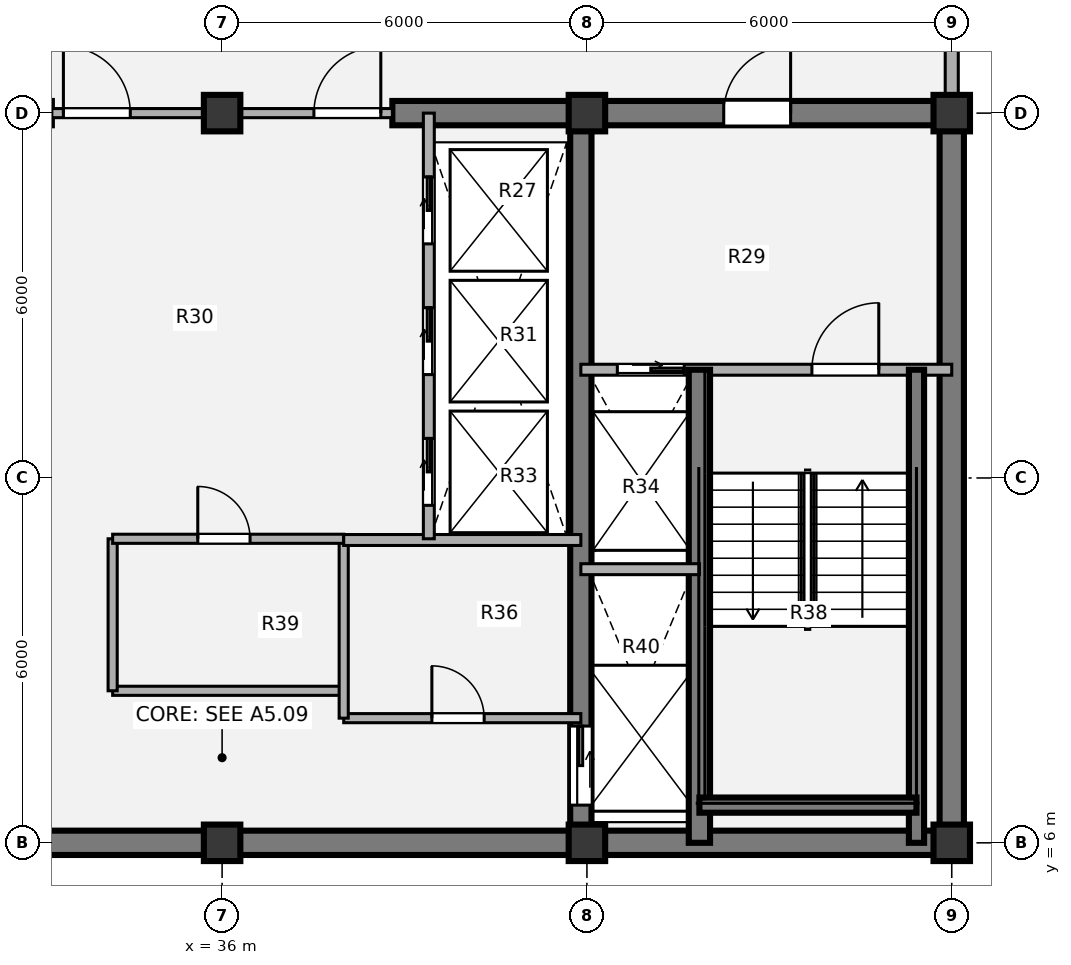
"""IFC4 building model, lengths in metres.
Left out: names, types, materials, properties, quantities, classifications, styles, units other than length and angle.
Written with IfcOpenShell. Run it as: python <this file> out.ifc"""

import sys

from ifc_helpers import new_model, si_unit, direction, frame, frame_2d, origin, origin_2d, place, context, subcontext, project, spatial, rectangle, extrude, source, transform, mapped, element, fill, save


model = new_model("IFC4")
c1 = context("Model", 3, precision=1e-05, world=origin(), true_north=direction((0.0, 1.0)))
c2 = subcontext(c1, "Body", "Model", "MODEL_VIEW")
j1 = project(units=[si_unit("LENGTHUNIT", "METRE"), si_unit("PLANEANGLEUNIT", "RADIAN")], contexts=[c1])
p1 = place(None, origin())
s1 = spatial("IfcSite", under=j1, at=p1, CompositionType="ELEMENT")
p2 = place(p1, origin())
s2 = spatial("IfcBuilding", under=s1, at=p2, CompositionType="ELEMENT")
p3 = place(p2, frame((0.0, 0.0, 234.36)))
s3 = spatial("IfcBuildingStorey", under=s2, at=p3, CompositionType="ELEMENT", Elevation=234.36)
m1 = source(origin(), c2, "Body", "SweptSolid", [
    extrude(rectangle(XDim=0.6, YDim=0.6, at=origin_2d()), origin(), (0.0, 0.0, 1.0), 3.78),
])
for number, where, z_axis, x_axis in (
    (1, (36.0, 6.0, 0.0), (0.0, 0.0, 1.0), (1.0, 0.0, 0.0)),
    (2, (42.0, 6.0, 0.0), (0.0, 0.0, 1.0), (1.0, 0.0, 0.0)),
    (3, (48.0, 6.0, 0.0), (0.0, 0.0, 1.0), (1.0, 0.0, 0.0)),
    (4, (36.0, 18.0, 0.0), (0.0, 0.0, 1.0), (1.0, 0.0, 0.0)),
    (5, (42.0, 18.0, 0.0), (0.0, 0.0, 1.0), (1.0, 0.0, 0.0)),
    (6, (48.0, 18.0, 0.0), (0.0, 0.0, 1.0), (1.0, 0.0, 0.0)),
):
    element("IfcColumn", number, at=place(p3, frame(where, z_axis=z_axis, x_axis=x_axis)), inside=s3, PredefinedType="COLUMN", context=c2, shape_type="MappedRepresentation", body=[
        mapped(m1, transform((0.0, 0.0, 0.0), x_axis=(1.0, 0.0, 0.0), y_axis=(0.0, 1.0, 0.0), z_axis=(0.0, 0.0, 1.0), scale=1.0)),
    ])
p4 = place(p3, frame((48.2, 6.0, 0.0), z_axis=(0.0, 0.0, 1.0), x_axis=(-1.0, 0.0, 0.0)))
e7 = element("IfcWall", 7, at=p4, inside=s3, PredefinedType="SHEAR", context=c2, shape_type="SweptSolid", body=[
    extrude(rectangle(XDim=24.4, YDim=0.4, at=frame_2d((12.2, 0.0))), origin(), (0.0, 0.0, 1.0), 3.78),
])
p5 = place(p3, frame((48.0, 18.0, 0.0), z_axis=(0.0, 0.0, 1.0), x_axis=(0.0, -1.0, 0.0)))
e8 = element("IfcWall", 8, at=p5, inside=s3, PredefinedType="SHEAR", context=c2, shape_type="SweptSolid", body=[
    extrude(rectangle(XDim=12.0, YDim=0.4, at=frame_2d((6.0, 0.0))), origin(), (0.0, 0.0, 1.0), 3.78),
])
p6 = place(p3, frame((38.8, 18.0, 0.0), z_axis=(0.0, 0.0, 1.0), x_axis=(1.0, 0.0, 0.0)))
e9 = element("IfcWall", 9, at=p6, inside=s3, PredefinedType="SHEAR", context=c2, shape_type="SweptSolid", body=[
    extrude(rectangle(XDim=9.4, YDim=0.4, at=frame_2d((4.7, 0.0))), origin(), (0.0, 0.0, 1.0), 3.78),
])
p7 = place(p6, frame((5.45, 0.0, 0.0)))
e10 = element("IfcOpeningElement", 10, at=p7, cuts=e9, PredefinedType="OPENING", context=c2, shape_type="SweptSolid", body=[
    extrude(rectangle(XDim=1.1, YDim=2.1, at=origin_2d()), frame((0.55, 0.21, 1.05), z_axis=(0.0, -1.0, 0.0), x_axis=(1.0, 0.0, 0.0)), (0.0, 0.0, 1.0), 0.42),
])
p8 = place(p3, frame((41.9, 18.0, 0.0), z_axis=(0.0, 0.0, 1.0), x_axis=(0.0, -1.0, 0.0)))
e11 = element("IfcWall", 11, at=p8, inside=s3, PredefinedType="SHEAR", context=c2, shape_type="SweptSolid", body=[
    extrude(rectangle(XDim=12.0, YDim=0.35, at=frame_2d((6.0, 0.0))), origin(), (0.0, 0.0, 1.0), 3.78),
])
p9 = place(p8, frame((10.08, 0.0, 0.0)))
e12 = element("IfcOpeningElement", 12, at=p9, cuts=e11, PredefinedType="OPENING", context=c2, shape_type="SweptSolid", body=[
    extrude(rectangle(XDim=1.3, YDim=2.1, at=origin_2d()), frame((0.65, 0.185, 1.05), z_axis=(0.0, -1.0, 0.0), x_axis=(1.0, 0.0, 0.0)), (0.0, 0.0, 1.0), 0.37),
])
p10 = place(p3, frame((48.0, 21.05, 0.0), z_axis=(0.0, 0.0, 1.0), x_axis=(0.0, -1.0, 0.0)))
e13 = element("IfcWall", 13, at=p10, inside=s3, PredefinedType="SOLIDWALL", context=c2, shape_type="SweptSolid", body=[
    extrude(rectangle(XDim=2.77, YDim=0.215, at=frame_2d((1.385, 0.0))), origin(), (0.0, 0.0, 1.0), 2.718),
])
p11 = place(p3, frame((34.2, 8.5, 0.0), z_axis=(0.0, 0.0, 1.0), x_axis=(1.0, 0.0, 0.0)))
e14 = element("IfcWall", 14, at=p11, inside=s3, PredefinedType="PARTITIONING", context=c2, shape_type="SweptSolid", body=[
    extrude(rectangle(XDim=3.8, YDim=0.15, at=frame_2d((1.9, 0.0))), origin(), (0.0, 0.0, 1.0), 3.5),
])
p12 = place(p3, frame((38.0, 8.05, 0.0), z_axis=(0.0, 0.0, 1.0), x_axis=(1.0, 0.0, 0.0)))
e15 = element("IfcWall", 15, at=p12, inside=s3, PredefinedType="PARTITIONING", context=c2, shape_type="SweptSolid", body=[
    extrude(rectangle(XDim=3.9, YDim=0.15, at=frame_2d((1.95, 0.0))), origin(), (0.0, 0.0, 1.0), 3.5),
])
p13 = place(p12, frame((1.45, 0.0, 0.0)))
e16 = element("IfcOpeningElement", 16, at=p13, cuts=e15, PredefinedType="OPENING", context=c2, shape_type="SweptSolid", body=[
    extrude(rectangle(XDim=0.86, YDim=2.1, at=origin_2d()), frame((0.43, 0.085, 1.05), z_axis=(0.0, -1.0, 0.0), x_axis=(1.0, 0.0, 0.0)), (0.0, 0.0, 1.0), 0.17),
])
p14 = place(p3, frame((34.2, 8.5, 0.0), z_axis=(0.0, 0.0, 1.0), x_axis=(0.0, 1.0, 0.0)))
e17 = element("IfcWall", 17, at=p14, inside=s3, PredefinedType="PARTITIONING", context=c2, shape_type="SweptSolid", body=[
    extrude(rectangle(XDim=2.5, YDim=0.15, at=frame_2d((1.25, 0.0))), origin(), (0.0, 0.0, 1.0), 3.5),
])
p15 = place(p3, frame((38.0, 8.05, 0.0), z_axis=(0.0, 0.0, 1.0), x_axis=(0.0, 1.0, 0.0)))
e18 = element("IfcWall", 18, at=p15, inside=s3, PredefinedType="PARTITIONING", context=c2, shape_type="SweptSolid", body=[
    extrude(rectangle(XDim=2.95, YDim=0.15, at=frame_2d((1.475, 0.0))), origin(), (0.0, 0.0, 1.0), 3.5),
])
p16 = place(p3, frame((34.2, 11.0, 0.0), z_axis=(0.0, 0.0, 1.0), x_axis=(1.0, 0.0, 0.0)))
e19 = element("IfcWall", 19, at=p16, inside=s3, PredefinedType="PARTITIONING", context=c2, shape_type="SweptSolid", body=[
    extrude(rectangle(XDim=3.8, YDim=0.15, at=frame_2d((1.9, 0.0))), origin(), (0.0, 0.0, 1.0), 3.5),
])
p17 = place(p16, frame((1.4, 0.0, 0.0)))
e20 = element("IfcOpeningElement", 20, at=p17, cuts=e19, PredefinedType="OPENING", context=c2, shape_type="SweptSolid", body=[
    extrude(rectangle(XDim=0.86, YDim=2.1, at=origin_2d()), frame((0.43, 0.085, 1.05), z_axis=(0.0, -1.0, 0.0), x_axis=(1.0, 0.0, 0.0)), (0.0, 0.0, 1.0), 0.17),
])
p18 = place(p3, frame((38.0, 10.98, 0.0), z_axis=(0.0, 0.0, 1.0), x_axis=(1.0, 0.0, 0.0)))
e21 = element("IfcWall", 21, at=p18, inside=s3, PredefinedType="PARTITIONING", context=c2, shape_type="SweptSolid", body=[
    extrude(rectangle(XDim=3.9, YDim=0.18, at=frame_2d((1.95, 0.0))), origin(), (0.0, 0.0, 1.0), 3.5),
])
p19 = place(p3, frame((33.2, 18.0, 0.0), z_axis=(0.0, 0.0, 1.0), x_axis=(1.0, 0.0, 0.0)))
e22 = element("IfcWall", 22, at=p19, inside=s3, PredefinedType="PARTITIONING", context=c2, shape_type="SweptSolid", body=[
    extrude(rectangle(XDim=5.6, YDim=0.15, at=frame_2d((2.8, 0.0))), origin(), (0.0, 0.0, 1.0), 2.515),
])
p20 = place(p19, frame((0.19, 0.0, 0.0)))
e23 = element("IfcOpeningElement", 23, at=p20, cuts=e22, PredefinedType="OPENING", context=c2, shape_type="SweptSolid", body=[
    extrude(rectangle(XDim=1.1, YDim=2.1, at=origin_2d()), frame((0.55, 0.085, 1.05), z_axis=(0.0, -1.0, 0.0), x_axis=(1.0, 0.0, 0.0)), (0.0, 0.0, 1.0), 0.17),
])
p21 = place(p19, frame((4.31, 0.0, 0.0)))
e24 = element("IfcOpeningElement", 24, at=p21, cuts=e22, PredefinedType="OPENING", context=c2, shape_type="SweptSolid", body=[
    extrude(rectangle(XDim=1.1, YDim=2.1, at=origin_2d()), frame((0.55, 0.085, 1.05), z_axis=(0.0, -1.0, 0.0), x_axis=(1.0, 0.0, 0.0)), (0.0, 0.0, 1.0), 0.17),
])
p22 = place(p3, frame((41.9, 13.78, 0.0), z_axis=(0.0, 0.0, 1.0), x_axis=(1.0, 0.0, 0.0)))
e25 = element("IfcWall", 25, at=p22, inside=s3, PredefinedType="PARTITIONING", context=c2, shape_type="SweptSolid", body=[
    extrude(rectangle(XDim=6.1, YDim=0.18, at=frame_2d((3.05, 0.0))), origin(), (0.0, 0.0, 1.0), 3.5),
])
p23 = place(p22, frame((0.6, 0.0, 0.0)))
e26 = element("IfcOpeningElement", 26, at=p23, cuts=e25, PredefinedType="OPENING", context=c2, shape_type="SweptSolid", body=[
    extrude(rectangle(XDim=1.1, YDim=2.1, at=origin_2d()), frame((0.55, 0.1, 1.05), z_axis=(0.0, -1.0, 0.0), x_axis=(1.0, 0.0, 0.0)), (0.0, 0.0, 1.0), 0.2),
])
p24 = place(p22, frame((3.8, 0.0, 0.0)))
e27 = element("IfcOpeningElement", 27, at=p24, cuts=e25, PredefinedType="OPENING", context=c2, shape_type="SweptSolid", body=[
    extrude(rectangle(XDim=1.1, YDim=2.1, at=origin_2d()), frame((0.55, 0.1, 1.05), z_axis=(0.0, -1.0, 0.0), x_axis=(1.0, 0.0, 0.0)), (0.0, 0.0, 1.0), 0.2),
])
p25 = place(p3, frame((43.85, 6.0, 0.0), z_axis=(0.0, 0.0, 1.0), x_axis=(0.0, 1.0, 0.0)))
e28 = element("IfcWall", 28, at=p25, inside=s3, PredefinedType="SHEAR", context=c2, shape_type="SweptSolid", body=[
    extrude(rectangle(XDim=7.78, YDim=0.35, at=frame_2d((3.89, 0.0))), origin(), (0.0, 0.0, 1.0), 3.85),
])
p26 = place(p3, frame((47.42, 6.0, 0.0), z_axis=(0.0, 0.0, 1.0), x_axis=(0.0, 1.0, 0.0)))
e29 = element("IfcWall", 29, at=p26, inside=s3, PredefinedType="SHEAR", context=c2, shape_type="SweptSolid", body=[
    extrude(rectangle(XDim=7.78, YDim=0.25, at=frame_2d((3.89, 0.0))), origin(), (0.0, 0.0, 1.0), 3.85),
])
p27 = place(p3, frame((43.85, 6.62, 0.0), z_axis=(0.0, 0.0, 1.0), x_axis=(1.0, 0.0, 0.0)))
e30 = element("IfcWall", 30, at=p27, inside=s3, PredefinedType="SHEAR", context=c2, shape_type="SweptSolid", body=[
    extrude(rectangle(XDim=3.57, YDim=0.25, at=frame_2d((1.785, 0.0))), origin(), (0.0, 0.0, 1.0), 3.85),
])
p28 = place(p3, frame((41.9, 10.5, 0.0), z_axis=(0.0, 0.0, 1.0), x_axis=(1.0, 0.0, 0.0)))
e31 = element("IfcWall", 31, at=p28, inside=s3, PredefinedType="PARTITIONING", context=c2, shape_type="SweptSolid", body=[
    extrude(rectangle(XDim=1.95, YDim=0.18, at=frame_2d((0.975, 0.0))), origin(), (0.0, 0.0, 1.0), 3.5),
])
p29 = place(p3, frame((39.4, 11.0, 0.0), z_axis=(0.0, 0.0, 1.0), x_axis=(0.0, 1.0, 0.0)))
e32 = element("IfcWall", 32, at=p29, inside=s3, PredefinedType="PARTITIONING", context=c2, shape_type="SweptSolid", body=[
    extrude(rectangle(XDim=7.0, YDim=0.18, at=frame_2d((3.5, 0.0))), origin(), (0.0, 0.0, 1.0), 3.5),
])
p30 = place(p29, frame((0.55, 0.0, 0.0)))
e33 = element("IfcOpeningElement", 33, at=p30, cuts=e32, PredefinedType="OPENING", context=c2, shape_type="SweptSolid", body=[
    extrude(rectangle(XDim=1.1, YDim=2.1, at=origin_2d()), frame((0.55, 0.1, 1.05), z_axis=(0.0, -1.0, 0.0), x_axis=(1.0, 0.0, 0.0)), (0.0, 0.0, 1.0), 0.2),
])
p31 = place(p29, frame((2.7, 0.0, 0.0)))
e34 = element("IfcOpeningElement", 34, at=p31, cuts=e32, PredefinedType="OPENING", context=c2, shape_type="SweptSolid", body=[
    extrude(rectangle(XDim=1.1, YDim=2.1, at=origin_2d()), frame((0.55, 0.1, 1.05), z_axis=(0.0, -1.0, 0.0), x_axis=(1.0, 0.0, 0.0)), (0.0, 0.0, 1.0), 0.2),
])
p32 = place(p29, frame((4.85, 0.0, 0.0)))
e35 = element("IfcOpeningElement", 35, at=p32, cuts=e32, PredefinedType="OPENING", context=c2, shape_type="SweptSolid", body=[
    extrude(rectangle(XDim=1.1, YDim=2.1, at=origin_2d()), frame((0.55, 0.1, 1.05), z_axis=(0.0, -1.0, 0.0), x_axis=(1.0, 0.0, 0.0)), (0.0, 0.0, 1.0), 0.2),
])
m2 = source(origin(), c2, "Body", "SweptSolid", [
    extrude(rectangle(XDim=0.86, YDim=2.1, at=origin_2d()), frame((0.43, 0.025, 1.05), z_axis=(0.0, -1.0, 0.0), x_axis=(1.0, 0.0, 0.0)), (0.0, 0.0, 1.0), 0.05),
])
p33 = place(p13, origin())
e36 = element("IfcDoor", 36, at=p33, inside=s3, OperationType="SINGLE_SWING_LEFT", PredefinedType="DOOR", context=c2, shape_type="MappedRepresentation", body=[
    mapped(m2, transform((0.0, 0.0, 0.0), x_axis=(1.0, 0.0, 0.0), y_axis=(0.0, 1.0, 0.0), z_axis=(0.0, 0.0, 1.0), scale=1.0)),
])
fill(e16, e36)
p34 = place(p17, origin())
e37 = element("IfcDoor", 37, at=p34, inside=s3, OperationType="SINGLE_SWING_LEFT", PredefinedType="DOOR", context=c2, shape_type="MappedRepresentation", body=[
    mapped(m2, transform((0.0, 0.0, 0.0), x_axis=(1.0, 0.0, 0.0), y_axis=(0.0, 1.0, 0.0), z_axis=(0.0, 0.0, 1.0), scale=1.0)),
])
fill(e20, e37)
m3 = source(origin(), c2, "Body", "SweptSolid", [
    extrude(rectangle(XDim=1.1, YDim=2.1, at=origin_2d()), frame((0.55, 0.025, 1.05), z_axis=(0.0, -1.0, 0.0), x_axis=(1.0, 0.0, 0.0)), (0.0, 0.0, 1.0), 0.05),
])
p35 = place(p20, origin())
e38 = element("IfcDoor", 38, at=p35, inside=s3, OperationType="SINGLE_SWING_LEFT", PredefinedType="DOOR", context=c2, shape_type="MappedRepresentation", body=[
    mapped(m3, transform((0.0, 0.0, 0.0), x_axis=(1.0, 0.0, 0.0), y_axis=(0.0, 1.0, 0.0), z_axis=(0.0, 0.0, 1.0), scale=1.0)),
])
fill(e23, e38)
p36 = place(p21, origin())
e39 = element("IfcDoor", 39, at=p36, inside=s3, OperationType="SINGLE_SWING_RIGHT", PredefinedType="DOOR", context=c2, shape_type="MappedRepresentation", body=[
    mapped(m3, transform((0.0, 0.0, 0.0), x_axis=(1.0, 0.0, 0.0), y_axis=(0.0, 1.0, 0.0), z_axis=(0.0, 0.0, 1.0), scale=1.0)),
])
fill(e24, e39)
m4 = source(origin(), c2, "Body", "SweptSolid", [
    extrude(rectangle(XDim=1.1, YDim=2.1, at=origin_2d()), frame((0.55, 0.025, 1.05), z_axis=(0.0, -1.0, 0.0), x_axis=(1.0, 0.0, 0.0)), (0.0, 0.0, 1.0), 0.05),
])
p37 = place(p23, origin())
e40 = element("IfcDoor", 40, at=p37, inside=s3, OperationType="SLIDING_TO_RIGHT", PredefinedType="DOOR", context=c2, shape_type="MappedRepresentation", body=[
    mapped(m4, transform((0.0, 0.0, 0.0), x_axis=(1.0, 0.0, 0.0), y_axis=(0.0, 1.0, 0.0), z_axis=(0.0, 0.0, 1.0), scale=1.0)),
])
fill(e26, e40)
m5 = source(origin(), c2, "Body", "SweptSolid", [
    extrude(rectangle(XDim=1.1, YDim=2.1, at=origin_2d()), frame((0.55, 0.025, 1.05), z_axis=(0.0, -1.0, 0.0), x_axis=(1.0, 0.0, 0.0)), (0.0, 0.0, 1.0), 0.05),
])
p38 = place(p24, origin())
e41 = element("IfcDoor", 41, at=p38, inside=s3, OperationType="SINGLE_SWING_RIGHT", PredefinedType="DOOR", context=c2, shape_type="MappedRepresentation", body=[
    mapped(m5, transform((0.0, 0.0, 0.0), x_axis=(1.0, 0.0, 0.0), y_axis=(0.0, 1.0, 0.0), z_axis=(0.0, 0.0, 1.0), scale=1.0)),
])
fill(e27, e41)
m6 = source(origin(), c2, "Body", "SweptSolid", [
    extrude(rectangle(XDim=1.3, YDim=2.1, at=origin_2d()), frame((0.65, 0.025, 1.05), z_axis=(0.0, -1.0, 0.0), x_axis=(1.0, 0.0, 0.0)), (0.0, 0.0, 1.0), 0.05),
])
p39 = place(p9, origin())
e42 = element("IfcDoor", 42, at=p39, inside=s3, OperationType="SLIDING_TO_LEFT", PredefinedType="DOOR", context=c2, shape_type="MappedRepresentation", body=[
    mapped(m6, transform((0.0, 0.0, 0.0), x_axis=(1.0, 0.0, 0.0), y_axis=(0.0, 1.0, 0.0), z_axis=(0.0, 0.0, 1.0), scale=1.0)),
])
fill(e12, e42)
p40 = place(p7, origin())
e43 = element("IfcDoor", 43, at=p40, inside=s3, OperationType="SINGLE_SWING_RIGHT", PredefinedType="DOOR", context=c2, shape_type="MappedRepresentation", body=[
    mapped(m3, transform((0.0, 0.0, 0.0), x_axis=(1.0, 0.0, 0.0), y_axis=(0.0, 1.0, 0.0), z_axis=(0.0, 0.0, 1.0), scale=1.0)),
])
fill(e10, e43)
p41 = place(p30, origin())
e44 = element("IfcDoor", 44, at=p41, inside=s3, OperationType="SLIDING_TO_RIGHT", PredefinedType="DOOR", context=c2, shape_type="MappedRepresentation", body=[
    mapped(m4, transform((0.0, 0.0, 0.0), x_axis=(1.0, 0.0, 0.0), y_axis=(0.0, 1.0, 0.0), z_axis=(0.0, 0.0, 1.0), scale=1.0)),
])
fill(e33, e44)
p42 = place(p31, origin())
e45 = element("IfcDoor", 45, at=p42, inside=s3, OperationType="SLIDING_TO_RIGHT", PredefinedType="DOOR", context=c2, shape_type="MappedRepresentation", body=[
    mapped(m4, transform((0.0, 0.0, 0.0), x_axis=(1.0, 0.0, 0.0), y_axis=(0.0, 1.0, 0.0), z_axis=(0.0, 0.0, 1.0), scale=1.0)),
])
fill(e34, e45)
p43 = place(p32, origin())
e46 = element("IfcDoor", 46, at=p43, inside=s3, OperationType="SLIDING_TO_RIGHT", PredefinedType="DOOR", context=c2, shape_type="MappedRepresentation", body=[
    mapped(m4, transform((0.0, 0.0, 0.0), x_axis=(1.0, 0.0, 0.0), y_axis=(0.0, 1.0, 0.0), z_axis=(0.0, 0.0, 1.0), scale=1.0)),
])
fill(e35, e46)
save(model, sys.argv[1])
